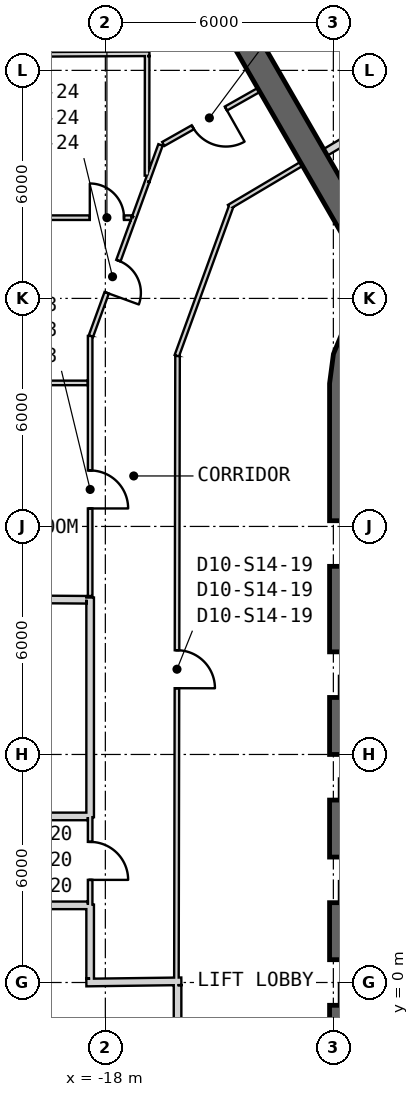
"""IFC4 building model, lengths in metres.
Left out: names, types, materials, properties, quantities, classifications, styles, units other than length and angle.
Written with IfcOpenShell. Run it as: python <this file> out.ifc"""

import sys

from ifc_helpers import new_model, si_unit, direction, frame, frame_2d, origin, place, context, subcontext, project, spatial, polyline, rectangle, outline, extrude, element, fill, save


model = new_model("IFC4")
c1 = context("Model", 3, precision=1e-05, world=origin(), true_north=direction((0.0, 1.0)))
c2 = subcontext(c1, "Body", "Model", "MODEL_VIEW")
j1 = project(units=[si_unit("LENGTHUNIT", "METRE"), si_unit("PLANEANGLEUNIT", "RADIAN")], contexts=[c1])
p1 = place(None, origin())
s1 = spatial("IfcSite", under=j1, at=p1, CompositionType="ELEMENT")
p2 = place(p1, origin())
s2 = spatial("IfcBuilding", under=s1, at=p2, CompositionType="ELEMENT")
p3 = place(p2, frame((0.0, 0.0, 229.2)))
s3 = spatial("IfcBuildingStorey", under=s2, at=p3, CompositionType="ELEMENT", Elevation=229.2)
p4 = place(p3, frame((-11.65, 15.762, 0.0), z_axis=(0.0, 0.0, 1.0), x_axis=(0.0, -1.0, 0.0)))
e1 = element("IfcWall", 1, at=p4, inside=s3, PredefinedType="SHEAR", context=c2, shape_type="SweptSolid", body=[
    extrude(rectangle(XDim=31.523, YDim=0.9, at=frame_2d((15.762, 0.0))), origin(), (0.0, 0.0, 1.0), 4.0),
])
p5 = place(p4, frame((7.062, 0.0, 0.0)))
e2 = element("IfcOpeningElement", 2, at=p5, cuts=e1, PredefinedType="OPENING", context=c2, shape_type="SweptSolid", body=[
    extrude(rectangle(XDim=1.2, YDim=2.4, at=frame_2d((0.6, 1.2))), frame((0.0, 0.46, 0.0), z_axis=(0.0, -1.0, 0.0), x_axis=(1.0, 0.0, 0.0)), (0.0, 0.0, 1.0), 0.92),
])
p6 = place(p4, frame((9.762, 0.0, 0.0)))
e3 = element("IfcOpeningElement", 3, at=p6, cuts=e1, PredefinedType="OPENING", context=c2, shape_type="SweptSolid", body=[
    extrude(rectangle(XDim=1.2, YDim=2.4, at=frame_2d((0.6, 1.2))), frame((0.0, 0.46, 0.0), z_axis=(0.0, -1.0, 0.0), x_axis=(1.0, 0.0, 0.0)), (0.0, 0.0, 1.0), 0.92),
])
p7 = place(p4, frame((12.462, 0.0, 0.0)))
e4 = element("IfcOpeningElement", 4, at=p7, cuts=e1, PredefinedType="OPENING", context=c2, shape_type="SweptSolid", body=[
    extrude(rectangle(XDim=1.2, YDim=2.4, at=frame_2d((0.6, 1.2))), frame((0.0, 0.46, 0.0), z_axis=(0.0, -1.0, 0.0), x_axis=(1.0, 0.0, 0.0)), (0.0, 0.0, 1.0), 0.92),
])
p8 = place(p4, frame((15.162, 0.0, 0.0)))
e5 = element("IfcOpeningElement", 5, at=p8, cuts=e1, PredefinedType="OPENING", context=c2, shape_type="SweptSolid", body=[
    extrude(rectangle(XDim=1.2, YDim=2.4, at=frame_2d((0.6, 1.2))), frame((0.0, 0.46, 0.0), z_axis=(0.0, -1.0, 0.0), x_axis=(1.0, 0.0, 0.0)), (0.0, 0.0, 1.0), 0.92),
])
p9 = place(p4, frame((17.862, 0.0, 0.0)))
e6 = element("IfcOpeningElement", 6, at=p9, cuts=e1, PredefinedType="OPENING", context=c2, shape_type="SweptSolid", body=[
    extrude(rectangle(XDim=1.2, YDim=2.4, at=frame_2d((0.6, 1.2))), frame((0.0, 0.46, 0.0), z_axis=(0.0, -1.0, 0.0), x_axis=(1.0, 0.0, 0.0)), (0.0, 0.0, 1.0), 0.92),
])
p10 = place(p4, frame((20.562, 0.0, 0.0)))
e7 = element("IfcOpeningElement", 7, at=p10, cuts=e1, PredefinedType="OPENING", context=c2, shape_type="SweptSolid", body=[
    extrude(rectangle(XDim=1.2, YDim=2.4, at=frame_2d((0.6, 1.2))), frame((0.0, 0.46, 0.0), z_axis=(0.0, -1.0, 0.0), x_axis=(1.0, 0.0, 0.0)), (0.0, 0.0, 1.0), 0.92),
])
p11 = place(p4, frame((23.262, 0.0, 0.0)))
e8 = element("IfcOpeningElement", 8, at=p11, cuts=e1, PredefinedType="OPENING", context=c2, shape_type="SweptSolid", body=[
    extrude(rectangle(XDim=1.2, YDim=2.4, at=frame_2d((0.6, 1.2))), frame((0.0, 0.46, 0.0), z_axis=(0.0, -1.0, 0.0), x_axis=(1.0, 0.0, 0.0)), (0.0, 0.0, 1.0), 0.92),
])
p12 = place(p4, frame((3.612, 0.0, 0.0)))
e9 = element("IfcOpeningElement", 9, at=p12, cuts=e1, PredefinedType="OPENING", context=c2, shape_type="SweptSolid", body=[
    extrude(rectangle(XDim=1.2, YDim=2.4, at=frame_2d((0.6, 1.2))), frame((0.0, 0.46, 0.0), z_axis=(0.0, -1.0, 0.0), x_axis=(1.0, 0.0, 0.0)), (0.0, 0.0, 1.0), 0.92),
])
p13 = place(p4, frame((26.712, 0.0, 0.0)))
e10 = element("IfcOpeningElement", 10, at=p13, cuts=e1, PredefinedType="OPENING", context=c2, shape_type="SweptSolid", body=[
    extrude(rectangle(XDim=1.2, YDim=2.4, at=frame_2d((0.6, 1.2))), frame((0.0, 0.46, 0.0), z_axis=(0.0, -1.0, 0.0), x_axis=(1.0, 0.0, 0.0)), (0.0, 0.0, 1.0), 0.92),
])
p14 = place(p3, origin())
e11 = element("IfcWall", 11, at=p14, inside=s3, PredefinedType="SHEAR", context=c2, shape_type="SweptSolid", body=[
    extrude(outline(polyline([(-7.6, 18.36), (-8.323, 18.659), (-9.1, 18.762), (-9.876, 18.659), (-10.6, 18.36), (-11.221, 17.883), (-11.698, 17.262), (-11.998, 16.538), (-12.1, 15.762), (-11.2, 15.762), (-11.128, 16.305), (-10.919, 16.812), (-10.585, 17.247), (-10.15, 17.58), (-9.644, 17.79), (-9.1, 17.862), (-8.556, 17.79), (-8.05, 17.58), (-7.6, 18.36)])), origin(), (0.0, 0.0, 1.0), 4.0),
])
p15 = place(p3, frame((-10.575, 18.316, 0.0), z_axis=(0.0, 0.0, 1.0), x_axis=(-0.499996344484, 0.866027514288, 0.0)))
e12 = element("IfcWall", 12, at=p15, inside=s3, PredefinedType="SHEAR", context=c2, shape_type="SweptSolid", body=[
    extrude(rectangle(XDim=11.368, YDim=0.7, at=frame_2d((5.684, 0.0))), origin(), (0.0, 0.0, 1.0), 4.0),
])
p16 = place(p3, frame((-12.839, 21.538, 0.0), z_axis=(0.0, 0.0, 1.0), x_axis=(-0.859953000024, -0.510373233771, 0.0)))
e13 = element("IfcWall", 13, at=p16, inside=s3, PredefinedType="PARTITIONING", context=c2, shape_type="SweptSolid", body=[
    extrude(rectangle(XDim=2.215, YDim=0.12, at=frame_2d((1.108, 0.0))), origin(), (0.0, 0.0, 1.0), 3.7),
])
p17 = place(p3, frame((-14.691, 20.419, 0.0), z_axis=(0.0, 0.0, 1.0), x_axis=(-0.342019678743, -0.93969278988, 0.0)))
e14 = element("IfcWall", 14, at=p17, inside=s3, PredefinedType="PARTITIONING", context=c2, shape_type="SweptSolid", body=[
    extrude(rectangle(XDim=4.181, YDim=0.12, at=frame_2d((2.09, 0.0))), origin(), (0.0, 0.0, 1.0), 2.78),
])
p18 = place(p3, frame((-16.1, 16.486, 0.0), z_axis=(0.0, 0.0, 1.0), x_axis=(-0.00180665503, -0.999998367997, 0.0)))
e15 = element("IfcWall", 15, at=p18, inside=s3, PredefinedType="PARTITIONING", context=c2, shape_type="SweptSolid", body=[
    extrude(rectangle(XDim=16.486, YDim=0.12, at=frame_2d((8.243, 0.0))), origin(), (0.0, 0.0, 1.0), 2.88),
])
p19 = place(p18, frame((7.743, 0.0, 0.0)))
e16 = element("IfcOpeningElement", 16, at=p19, cuts=e15, PredefinedType="OPENING", context=c2, shape_type="SweptSolid", body=[
    extrude(rectangle(XDim=1.0, YDim=2.1, at=frame_2d((0.5, 1.05))), frame((0.0, 0.07, 0.0), z_axis=(0.0, -1.0, 0.0), x_axis=(1.0, 0.0, 0.0)), (0.0, 0.0, 1.0), 0.14),
])
p20 = place(p3, frame((-18.4, 17.012, 0.0), z_axis=(0.0, 0.0, 1.0), x_axis=(0.0, -1.0, 0.0)))
e17 = element("IfcWall", 17, at=p20, inside=s3, PredefinedType="PARTITIONING", context=c2, shape_type="SweptSolid", body=[
    extrude(rectangle(XDim=6.842, YDim=0.12, at=frame_2d((3.421, 0.0))), origin(), (0.0, 0.0, 1.0), 2.88),
])
p21 = place(p20, frame((3.539, 0.0, 0.0)))
e18 = element("IfcOpeningElement", 18, at=p21, cuts=e17, PredefinedType="OPENING", context=c2, shape_type="SweptSolid", body=[
    extrude(rectangle(XDim=1.0, YDim=2.1, at=frame_2d((0.5, 1.05))), frame((0.0, 0.07, 0.0), z_axis=(0.0, -1.0, 0.0), x_axis=(1.0, 0.0, 0.0)), (0.0, 0.0, 1.0), 0.14),
])
p22 = place(p3, frame((-18.4, 4.35, 0.0), z_axis=(0.0, 0.0, 1.0), x_axis=(0.0, -1.0, 0.0)))
e19 = element("IfcWall", 19, at=p22, inside=s3, PredefinedType="PARTITIONING", context=c2, shape_type="SweptSolid", body=[
    extrude(rectangle(XDim=2.3, YDim=0.12, at=frame_2d((1.15, 0.0))), origin(), (0.0, 0.0, 1.0), 3.7),
])
p23 = place(p22, frame((0.65, 0.0, 0.0)))
e20 = element("IfcOpeningElement", 20, at=p23, cuts=e19, PredefinedType="OPENING", context=c2, shape_type="SweptSolid", body=[
    extrude(rectangle(XDim=1.0, YDim=2.1, at=frame_2d((0.5, 1.05))), frame((0.0, 0.07, 0.0), z_axis=(0.0, -1.0, 0.0), x_axis=(1.0, 0.0, 0.0)), (0.0, 0.0, 1.0), 0.14),
])
p24 = place(p3, frame((-18.5, -0.001, 0.0), z_axis=(0.0, 0.0, 1.0), x_axis=(0.999915662945, 0.012987185857, 0.0)))
e21 = element("IfcWall", 21, at=p24, inside=s3, PredefinedType="PARTITIONING", context=c2, shape_type="SweptSolid", body=[
    extrude(rectangle(XDim=2.5, YDim=0.2, at=frame_2d((1.25, 0.0))), origin(), (0.0, 0.0, 1.0), 3.07),
])
p25 = place(p3, frame((-18.4, 10.13, 0.0), z_axis=(0.0, 0.0, 1.0), x_axis=(0.0, -1.0, 0.0)))
e22 = element("IfcWall", 22, at=p25, inside=s3, PredefinedType="PARTITIONING", context=c2, shape_type="SweptSolid", body=[
    extrude(rectangle(XDim=5.78, YDim=0.2, at=frame_2d((2.89, 0.0))), origin(), (0.0, 0.0, 1.0), 3.07),
])
p26 = place(p3, frame((-18.4, 2.05, 0.0), z_axis=(0.0, 0.0, 1.0), x_axis=(0.0, -1.0, 0.0)))
e23 = element("IfcWall", 23, at=p26, inside=s3, PredefinedType="PARTITIONING", context=c2, shape_type="SweptSolid", body=[
    extrude(rectangle(XDim=1.95, YDim=0.2, at=frame_2d((0.975, 0.0))), origin(), (0.0, 0.0, 1.0), 3.07),
])
p27 = place(p3, frame((-16.549, 22.039, 0.0), z_axis=(0.0, 0.0, 1.0), x_axis=(-0.34206932631, -0.939674718186, 0.0)))
e24 = element("IfcWall", 24, at=p27, inside=s3, PredefinedType="PARTITIONING", context=c2, shape_type="SweptSolid", body=[
    extrude(rectangle(XDim=1.021, YDim=0.12, at=frame_2d((0.511, 0.0))), origin(), (0.0, 0.0, 1.0), 3.7),
])
p28 = place(p3, frame((-16.898, 21.079, 0.0), z_axis=(0.0, 0.0, 1.0), x_axis=(-0.341879433665, -0.939743822984, 0.0)))
e25 = element("IfcWall", 25, at=p28, inside=s3, PredefinedType="PARTITIONING", context=c2, shape_type="SweptSolid", body=[
    extrude(rectangle(XDim=1.006, YDim=0.12, at=frame_2d((0.503, 0.0))), origin(), (0.0, 0.0, 1.0), 2.78),
])
p29 = place(p3, frame((-17.242, 20.134, 0.0), z_axis=(0.0, 0.0, 1.0), x_axis=(-0.34200828308, -0.939696937478, 0.0)))
e26 = element("IfcWall", 26, at=p29, inside=s3, PredefinedType="PARTITIONING", context=c2, shape_type="SweptSolid", body=[
    extrude(rectangle(XDim=3.326, YDim=0.12, at=frame_2d((1.663, 0.0))), origin(), (0.0, 0.0, 1.0), 2.88),
])
p30 = place(p29, frame((1.213, 0.0, 0.0)))
e27 = element("IfcOpeningElement", 27, at=p30, cuts=e26, PredefinedType="OPENING", context=c2, shape_type="SweptSolid", body=[
    extrude(rectangle(XDim=0.9, YDim=2.1, at=frame_2d((0.45, 1.05))), frame((0.0, 0.07, 0.0), z_axis=(0.0, -1.0, 0.0), x_axis=(1.0, 0.0, 0.0)), (0.0, 0.0, 1.0), 0.14),
])
p31 = place(p3, frame((-13.963, 23.484, 0.0), z_axis=(0.0, 0.0, 1.0), x_axis=(-0.870462007122, -0.49223560838, 0.0)))
e28 = element("IfcWall", 28, at=p31, inside=s3, PredefinedType="PARTITIONING", context=c2, shape_type="SweptSolid", body=[
    extrude(rectangle(XDim=2.887, YDim=0.12, at=frame_2d((1.443, 0.0))), origin(), (0.0, 0.0, 1.0), 3.7),
])
p32 = place(p31, frame((0.993, 0.0, 0.0)))
e29 = element("IfcOpeningElement", 29, at=p32, cuts=e28, PredefinedType="OPENING", context=c2, shape_type="SweptSolid", body=[
    extrude(rectangle(XDim=1.0, YDim=2.1, at=frame_2d((0.5, 1.05))), frame((0.0, 0.07, 0.0), z_axis=(0.0, -1.0, 0.0), x_axis=(1.0, 0.0, 0.0)), (0.0, 0.0, 1.0), 0.14),
])
p33 = place(p3, frame((-16.1, -0.07, 0.0), z_axis=(0.0, 0.0, 1.0), x_axis=(0.0, -1.0, 0.0)))
e30 = element("IfcWall", 30, at=p33, inside=s3, PredefinedType="PARTITIONING", context=c2, shape_type="SweptSolid", body=[
    extrude(rectangle(XDim=10.71, YDim=0.2, at=frame_2d((5.355, 0.0))), origin(), (0.0, 0.0, 1.0), 2.98),
])
p34 = place(p3, frame((-10.265, 22.996, 0.0), z_axis=(0.0, 0.0, 1.0), x_axis=(-0.859934823121, -0.510403859687, 0.0)))
e31 = element("IfcWall", 31, at=p34, inside=s3, PredefinedType="PARTITIONING", context=c2, shape_type="SweptSolid", body=[
    extrude(rectangle(XDim=2.258, YDim=0.2, at=frame_2d((1.129, 0.0))), origin(), (0.0, 0.0, 1.0), 3.7),
])
p35 = place(p3, frame((-28.655, 2.03, 0.0), z_axis=(0.0, 0.0, 1.0), x_axis=(1.0, 0.0, 0.0)))
e32 = element("IfcWall", 32, at=p35, inside=s3, PredefinedType="PARTITIONING", context=c2, shape_type="SweptSolid", body=[
    extrude(rectangle(XDim=10.195, YDim=0.2, at=frame_2d((5.098, 0.0))), origin(), (0.0, 0.0, 1.0), 3.7),
])
p36 = place(p35, frame((4.598, 0.0, 0.0)))
e33 = element("IfcOpeningElement", 33, at=p36, cuts=e32, PredefinedType="OPENING", context=c2, shape_type="SweptSolid", body=[
    extrude(rectangle(XDim=1.0, YDim=2.1, at=frame_2d((0.5, 1.05))), frame((0.0, 0.11, 0.0), z_axis=(0.0, -1.0, 0.0), x_axis=(1.0, 0.0, 0.0)), (0.0, 0.0, 1.0), 0.22),
])
p37 = place(p3, frame((-18.46, 4.37, 0.0), z_axis=(0.0, 0.0, 1.0), x_axis=(-1.0, 0.0, 0.0)))
e34 = element("IfcWall", 34, at=p37, inside=s3, PredefinedType="PARTITIONING", context=c2, shape_type="SweptSolid", body=[
    extrude(rectangle(XDim=10.196, YDim=0.2, at=frame_2d((5.098, 0.0))), origin(), (0.0, 0.0, 1.0), 3.7),
])
p38 = place(p37, frame((4.598, 0.0, 0.0)))
e35 = element("IfcOpeningElement", 35, at=p38, cuts=e34, PredefinedType="OPENING", context=c2, shape_type="SweptSolid", body=[
    extrude(rectangle(XDim=1.0, YDim=2.1, at=frame_2d((0.5, 1.05))), frame((0.0, 0.11, 0.0), z_axis=(0.0, -1.0, 0.0), x_axis=(1.0, 0.0, 0.0)), (0.0, 0.0, 1.0), 0.22),
])
p39 = place(p3, frame((-22.63, 10.099, 0.0), z_axis=(0.0, 0.0, 1.0), x_axis=(0.999976081673, -0.006916363298, 0.0)))
e36 = element("IfcWall", 36, at=p39, inside=s3, PredefinedType="PARTITIONING", context=c2, shape_type="SweptSolid", body=[
    extrude(rectangle(XDim=4.13, YDim=0.2, at=frame_2d((2.065, 0.0))), origin(), (0.0, 0.0, 1.0), 3.7),
])
p40 = place(p3, frame((-18.46, 15.776, 0.0), z_axis=(0.0, 0.0, 1.0), x_axis=(-1.0, 0.0, 0.0)))
e37 = element("IfcWall", 37, at=p40, inside=s3, PredefinedType="PARTITIONING", context=c2, shape_type="SweptSolid", body=[
    extrude(rectangle(XDim=4.17, YDim=0.12, at=frame_2d((2.085, 0.0))), origin(), (0.0, 0.0, 1.0), 3.7),
])
p41 = place(p3, frame((-22.63, 20.124, 0.0), z_axis=(0.0, 0.0, 1.0), x_axis=(1.0, 0.0, 0.0)))
e38 = element("IfcWall", 38, at=p41, inside=s3, PredefinedType="PARTITIONING", context=c2, shape_type="SweptSolid", body=[
    extrude(rectangle(XDim=5.321, YDim=0.12, at=frame_2d((2.66, 0.0))), origin(), (0.0, 0.0, 1.0), 3.7),
])
p42 = place(p41, frame((4.221, 0.0, 0.0)))
e39 = element("IfcOpeningElement", 39, at=p42, cuts=e38, PredefinedType="OPENING", context=c2, shape_type="SweptSolid", body=[
    extrude(rectangle(XDim=0.9, YDim=2.1, at=frame_2d((0.45, 1.05))), frame((0.0, 0.07, 0.0), z_axis=(0.0, -1.0, 0.0), x_axis=(1.0, 0.0, 0.0)), (0.0, 0.0, 1.0), 0.14),
])
p43 = place(p3, frame((-22.63, 24.407, 0.0), z_axis=(0.0, 0.0, 1.0), x_axis=(0.999986767717, 0.005144355288, 0.0)))
e40 = element("IfcWall", 40, at=p43, inside=s3, PredefinedType="PARTITIONING", context=c2, shape_type="SweptSolid", body=[
    extrude(rectangle(XDim=5.79, YDim=0.12, at=frame_2d((2.895, 0.0))), origin(), (0.0, 0.0, 1.0), 2.78),
])
p44 = place(p3, frame((-16.905, 21.23, 0.0), z_axis=(0.0, 0.0, 1.0), x_axis=(0.001474466813, 0.999998912973, 0.0)))
e41 = element("IfcWall", 41, at=p44, inside=s3, PredefinedType="PARTITIONING", context=c2, shape_type="SweptSolid", body=[
    extrude(rectangle(XDim=3.146, YDim=0.12, at=frame_2d((1.573, 0.0))), origin(), (0.0, 0.0, 1.0), 3.7),
])
p45 = place(p19, origin())
e42 = element("IfcDoor", 42, at=p45, inside=s3, OperationType="SINGLE_SWING_RIGHT", PredefinedType="NOTDEFINED", context=c2, shape_type="SweptSolid", body=[
    extrude(rectangle(XDim=1.0, YDim=2.1, at=frame_2d((0.5, 1.05))), frame((0.0, 0.025, 0.0), z_axis=(0.0, -1.0, 0.0), x_axis=(1.0, 0.0, 0.0)), (0.0, 0.0, 1.0), 0.05),
])
fill(e16, e42)
p46 = place(p23, origin())
e43 = element("IfcDoor", 43, at=p46, inside=s3, OperationType="SINGLE_SWING_RIGHT", PredefinedType="NOTDEFINED", context=c2, shape_type="SweptSolid", body=[
    extrude(rectangle(XDim=1.0, YDim=2.1, at=frame_2d((0.5, 1.05))), frame((0.0, 0.025, 0.0), z_axis=(0.0, -1.0, 0.0), x_axis=(1.0, 0.0, 0.0)), (0.0, 0.0, 1.0), 0.05),
])
fill(e20, e43)
p47 = place(p21, origin())
e44 = element("IfcDoor", 44, at=p47, inside=s3, OperationType="SINGLE_SWING_LEFT", PredefinedType="NOTDEFINED", context=c2, shape_type="SweptSolid", body=[
    extrude(rectangle(XDim=1.0, YDim=2.1, at=frame_2d((0.5, 1.05))), frame((0.0, 0.025, 0.0), z_axis=(0.0, -1.0, 0.0), x_axis=(1.0, 0.0, 0.0)), (0.0, 0.0, 1.0), 0.05),
])
fill(e18, e44)
p48 = place(p30, origin())
e45 = element("IfcDoor", 45, at=p48, inside=s3, OperationType="SINGLE_SWING_RIGHT", PredefinedType="NOTDEFINED", context=c2, shape_type="SweptSolid", body=[
    extrude(rectangle(XDim=0.9, YDim=2.1, at=frame_2d((0.45, 1.05))), frame((0.0, 0.025, 0.0), z_axis=(0.0, -1.0, 0.0), x_axis=(1.0, 0.0, 0.0)), (0.0, 0.0, 1.0), 0.05),
])
fill(e27, e45)
p49 = place(p42, origin())
e46 = element("IfcDoor", 46, at=p49, inside=s3, OperationType="SINGLE_SWING_RIGHT", PredefinedType="NOTDEFINED", context=c2, shape_type="SweptSolid", body=[
    extrude(rectangle(XDim=0.9, YDim=2.1, at=frame_2d((0.45, 1.05))), frame((0.0, 0.025, 0.0), z_axis=(0.0, -1.0, 0.0), x_axis=(1.0, 0.0, 0.0)), (0.0, 0.0, 1.0), 0.05),
])
fill(e39, e46)
p50 = place(p32, origin())
e47 = element("IfcDoor", 47, at=p50, inside=s3, OperationType="SINGLE_SWING_LEFT", PredefinedType="NOTDEFINED", context=c2, shape_type="SweptSolid", body=[
    extrude(rectangle(XDim=1.0, YDim=2.1, at=frame_2d((0.5, 1.05))), frame((0.0, 0.025, 0.0), z_axis=(0.0, -1.0, 0.0), x_axis=(1.0, 0.0, 0.0)), (0.0, 0.0, 1.0), 0.05),
])
fill(e29, e47)
save(model, sys.argv[1])
